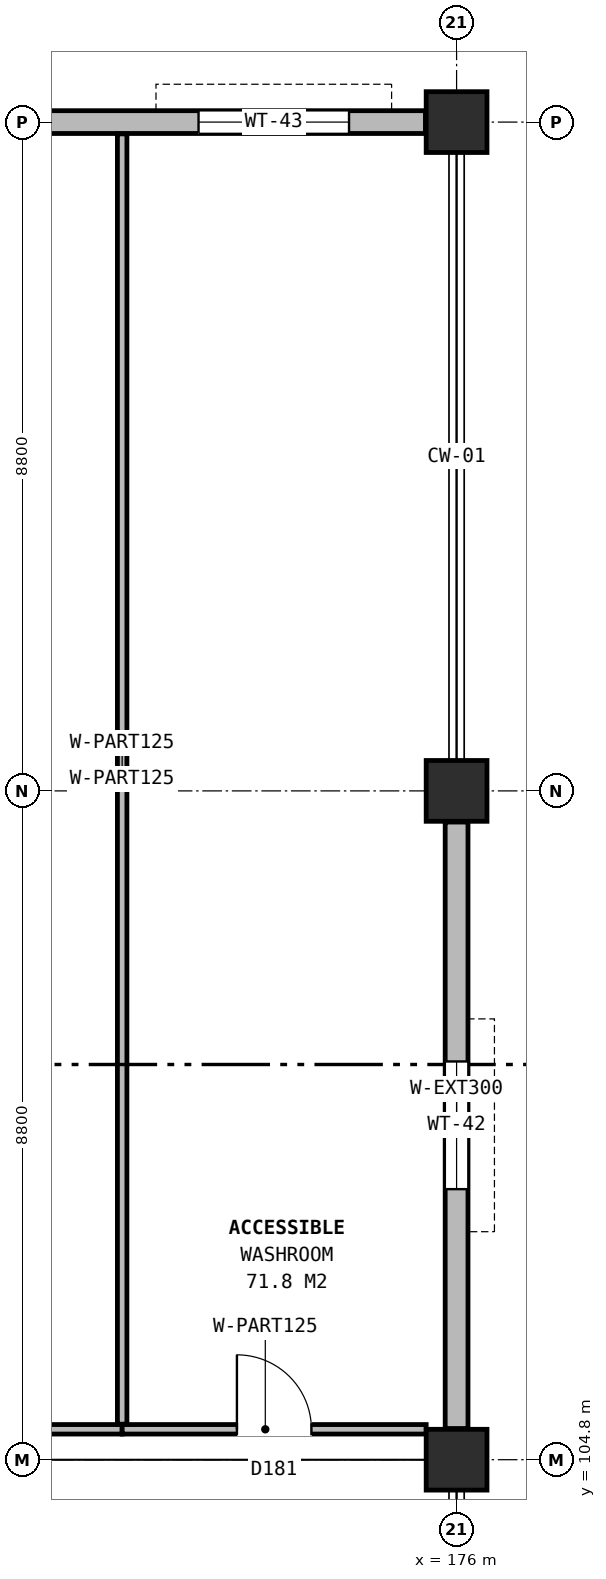
"""IFC4 building model, lengths in metres.
Left out: names, types, materials, properties, quantities, classifications, styles, units other than length and angle.
Written with IfcOpenShell. Run it as: python <this file> out.ifc"""

import sys

from ifc_helpers import new_model, si_unit, direction, frame, frame_2d, origin, origin_2d, place, context, subcontext, project, spatial, rectangle, extrude, element, fill, save


model = new_model("IFC4")
c1 = context("Model", 3, precision=1e-05, world=origin(), true_north=direction((0.0, 1.0)))
c2 = subcontext(c1, "Body", "Model", "MODEL_VIEW")
j1 = project(units=[si_unit("LENGTHUNIT", "METRE"), si_unit("PLANEANGLEUNIT", "RADIAN")], contexts=[c1])
p1 = place(None, origin())
s1 = spatial("IfcSite", under=j1, at=p1, CompositionType="ELEMENT")
p2 = place(p1, origin())
s2 = spatial("IfcBuilding", under=s1, at=p2, CompositionType="ELEMENT")
p3 = place(p2, frame((0.0, 0.0, 9.0)))
s3 = spatial("IfcBuildingStorey", under=s2, at=p3, CompositionType="ELEMENT", Elevation=9.0)
for number, where, z_axis, x_axis in (
    (1, (176.0, 104.8, 0.0), (0.0, 0.0, 1.0), (1.0, 0.0, 0.0)),
    (2, (176.0, 113.6, 0.0), (0.0, 0.0, 1.0), (1.0, 0.0, 0.0)),
    (3, (176.0, 122.4, 0.0), (0.0, 0.0, 1.0), (1.0, 0.0, 0.0)),
):
    element("IfcColumn", number, at=place(p3, frame(where, z_axis=z_axis, x_axis=x_axis)), inside=s3, PredefinedType="COLUMN", context=c2, shape_type="SweptSolid", body=[
        extrude(rectangle(XDim=0.8, YDim=0.8, at=origin_2d()), origin(), (0.0, 0.0, 1.0), 4.2),
    ])
p4 = place(p3, frame((176.0, 105.21, 0.0), z_axis=(0.0, 0.0, 1.0), x_axis=(0.0, 1.0, 0.0)))
e4 = element("IfcWall", 4, at=p4, inside=s3, PredefinedType="SOLIDWALL", context=c2, shape_type="SweptSolid", body=[
    extrude(rectangle(XDim=7.98, YDim=0.3, at=frame_2d((3.99, 0.0))), origin(), (0.0, 0.0, 1.0), 3.45),
])
p5 = place(p4, frame((3.15, 0.0, 0.9)))
e5 = element("IfcOpeningElement", 5, at=p5, cuts=e4, PredefinedType="OPENING", context=c2, shape_type="SweptSolid", body=[
    extrude(rectangle(XDim=1.68, YDim=2.28, at=frame_2d((0.84, 1.14))), frame((0.0, 0.16, 0.0), z_axis=(0.0, -1.0, 0.0), x_axis=(1.0, 0.0, 0.0)), (0.0, 0.0, 1.0), 0.32),
])
p6 = place(p3, frame((175.59, 122.4, 0.0), z_axis=(0.0, 0.0, 1.0), x_axis=(-1.0, 0.0, 0.0)))
e6 = element("IfcWall", 6, at=p6, inside=s3, PredefinedType="SOLIDWALL", context=c2, shape_type="SweptSolid", body=[
    extrude(rectangle(XDim=7.58, YDim=0.3, at=frame_2d((3.79, 0.0))), origin(), (0.0, 0.0, 1.0), 3.45),
])
p7 = place(p6, frame((1.005, 0.0, 0.9)))
e7 = element("IfcOpeningElement", 7, at=p7, cuts=e6, PredefinedType="OPENING", context=c2, shape_type="SweptSolid", body=[
    extrude(rectangle(XDim=1.98, YDim=2.32, at=frame_2d((0.99, 1.16))), frame((0.0, 0.16, 0.0), z_axis=(0.0, -1.0, 0.0), x_axis=(1.0, 0.0, 0.0)), (0.0, 0.0, 1.0), 0.32),
])
p8 = place(p3, frame((167.355, 105.2, 0.0), z_axis=(0.0, 0.0, 1.0), x_axis=(1.0, 0.0, 0.0)))
e8 = element("IfcWall", 8, at=p8, inside=s3, PredefinedType="PARTITIONING", context=c2, shape_type="SweptSolid", body=[
    extrude(rectangle(XDim=4.245, YDim=0.125, at=frame_2d((2.123, 0.0))), origin(), (0.0, 0.0, 1.0), 3.245),
])
p9 = place(p8, frame((1.633, 0.0, 0.0)))
e9 = element("IfcOpeningElement", 9, at=p9, cuts=e8, PredefinedType="OPENING", context=c2, shape_type="SweptSolid", body=[
    extrude(rectangle(XDim=0.98, YDim=2.1, at=frame_2d((0.49, 1.05))), frame((0.0, 0.073, 0.0), z_axis=(0.0, -1.0, 0.0), x_axis=(1.0, 0.0, 0.0)), (0.0, 0.0, 1.0), 0.145),
])
p10 = place(p3, frame((171.6, 105.2, 0.0), z_axis=(0.0, 0.0, 1.0), x_axis=(1.0, 0.0, 0.0)))
e10 = element("IfcWall", 10, at=p10, inside=s3, PredefinedType="PARTITIONING", context=c2, shape_type="SweptSolid", body=[
    extrude(rectangle(XDim=4.0, YDim=0.125, at=frame_2d((2.0, 0.0))), origin(), (0.0, 0.0, 1.0), 3.245),
])
p11 = place(p10, frame((1.51, 0.0, 0.0)))
e11 = element("IfcOpeningElement", 11, at=p11, cuts=e10, PredefinedType="OPENING", context=c2, shape_type="SweptSolid", body=[
    extrude(rectangle(XDim=0.98, YDim=2.1, at=frame_2d((0.49, 1.05))), frame((0.0, 0.073, 0.0), z_axis=(0.0, -1.0, 0.0), x_axis=(1.0, 0.0, 0.0)), (0.0, 0.0, 1.0), 0.145),
])
p12 = place(p3, frame((171.6, 105.268, 0.0), z_axis=(0.0, 0.0, 1.0), x_axis=(0.0, 1.0, 0.0)))
e12 = element("IfcWall", 12, at=p12, inside=s3, PredefinedType="PARTITIONING", context=c2, shape_type="SweptSolid", body=[
    extrude(rectangle(XDim=16.978, YDim=0.125, at=frame_2d((8.489, 0.0))), origin(), (0.0, 0.0, 1.0), 3.865),
])
p13 = place(p5, origin())
e13 = element("IfcWindow", 13, at=p13, inside=s3, PartitioningType="SINGLE_PANEL", PredefinedType="WINDOW", context=c2, shape_type="SweptSolid", body=[
    extrude(rectangle(XDim=1.68, YDim=2.28, at=frame_2d((0.84, 1.14))), frame((0.0, 0.03, 0.0), z_axis=(0.0, -1.0, 0.0), x_axis=(1.0, 0.0, 0.0)), (0.0, 0.0, 1.0), 0.06),
])
fill(e5, e13)
p14 = place(p7, origin())
e14 = element("IfcWindow", 14, at=p14, inside=s3, PartitioningType="SINGLE_PANEL", PredefinedType="WINDOW", context=c2, shape_type="SweptSolid", body=[
    extrude(rectangle(XDim=1.98, YDim=2.32, at=frame_2d((0.99, 1.16))), frame((0.0, 0.03, 0.0), z_axis=(0.0, -1.0, 0.0), x_axis=(1.0, 0.0, 0.0)), (0.0, 0.0, 1.0), 0.06),
])
fill(e7, e14)
p15 = place(p11, origin())
e15 = element("IfcDoor", 15, at=p15, inside=s3, OperationType="SINGLE_SWING_LEFT", PredefinedType="DOOR", context=c2, shape_type="SweptSolid", body=[
    extrude(rectangle(XDim=0.98, YDim=2.1, at=frame_2d((0.49, 1.05))), frame((0.0, 0.025, 0.0), z_axis=(0.0, -1.0, 0.0), x_axis=(1.0, 0.0, 0.0)), (0.0, 0.0, 1.0), 0.05),
])
fill(e11, e15)
save(model, sys.argv[1])
